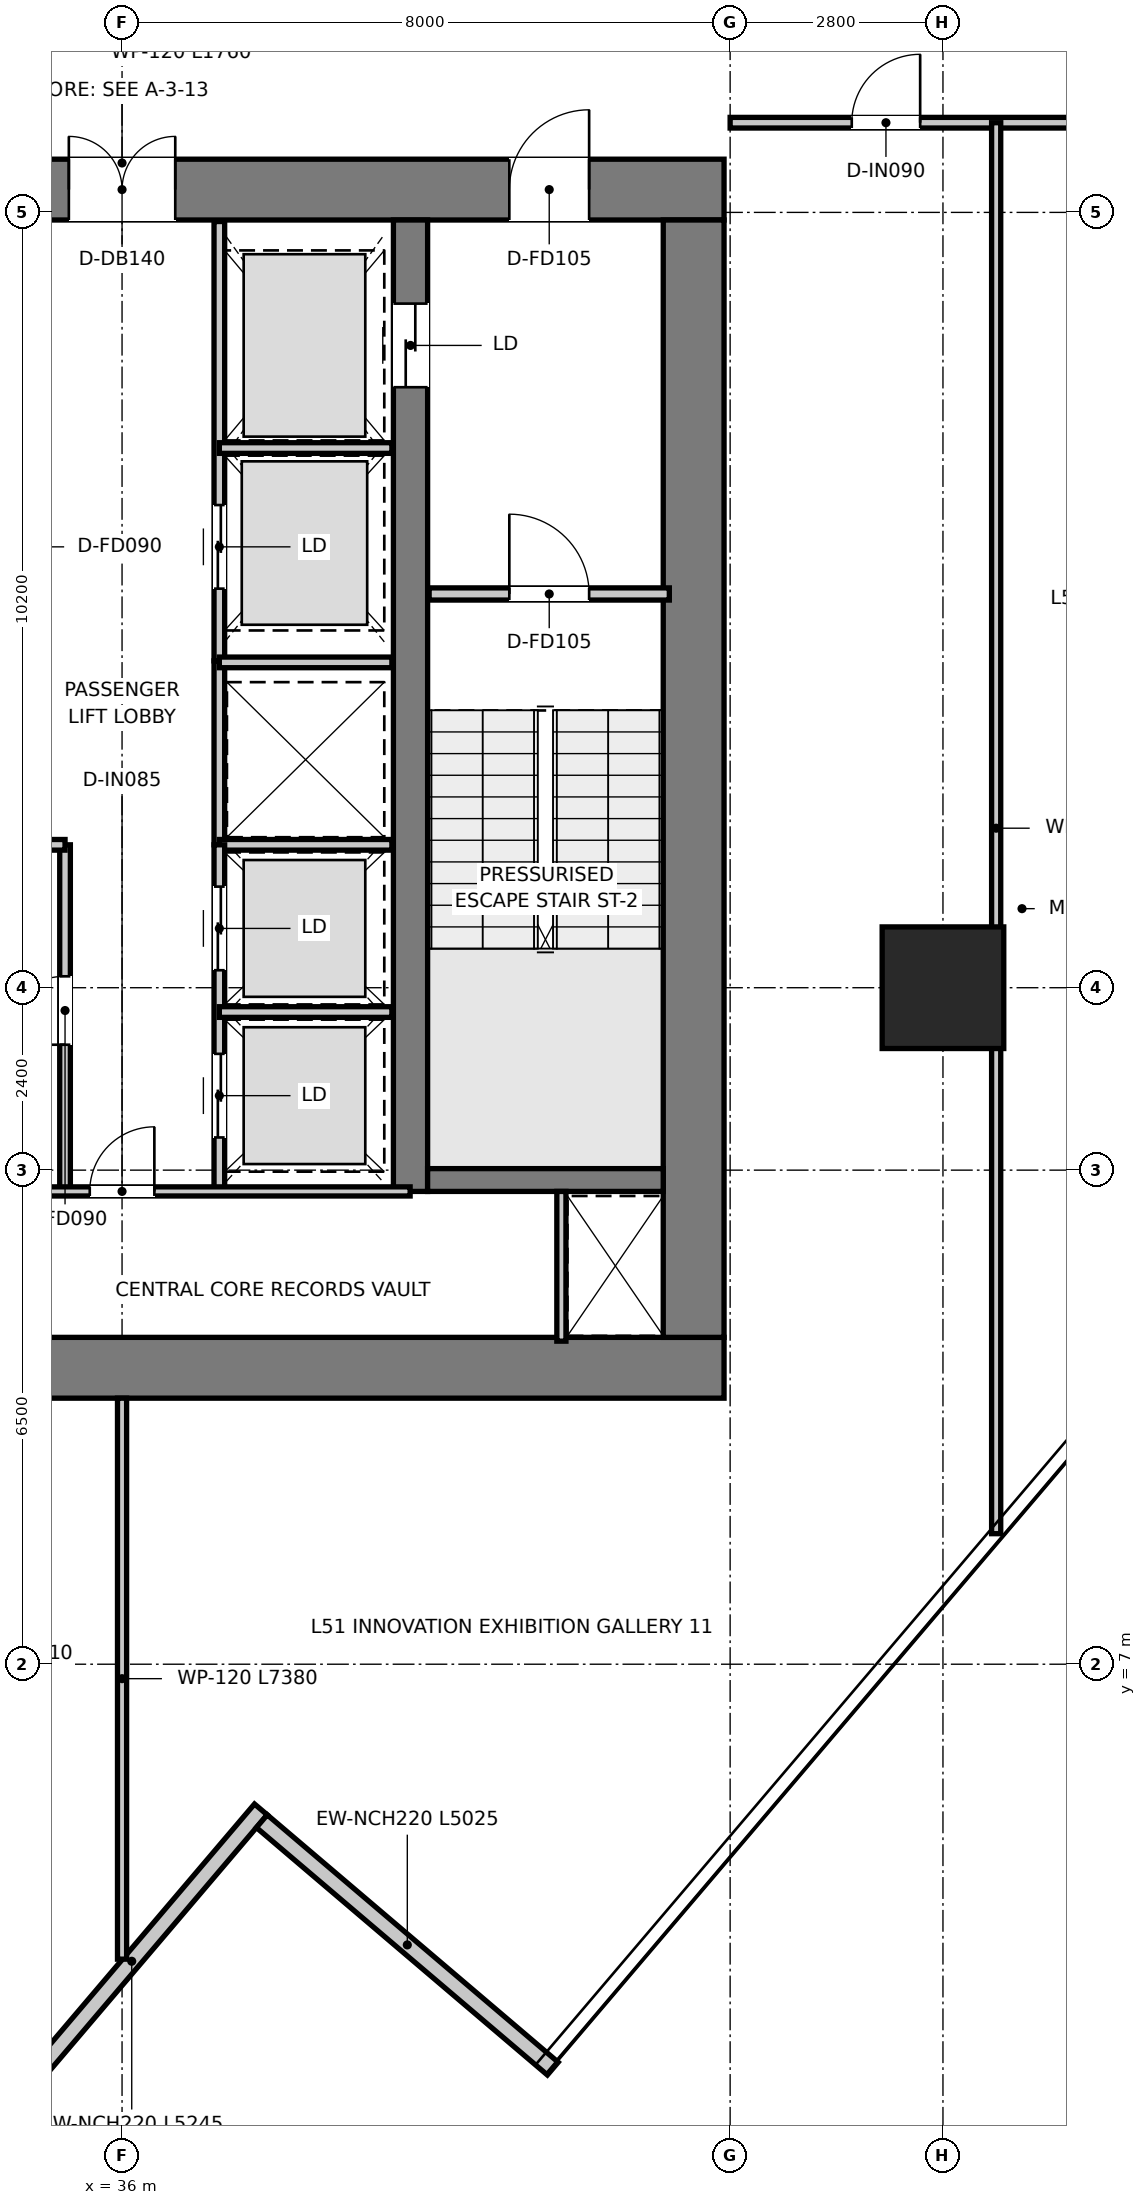
"""IFC4 building model, lengths in metres.
Left out: names, types, materials, properties, quantities, classifications, styles, units other than length and angle.
Written with IfcOpenShell. Run it as: python <this file> out.ifc"""

import sys

from ifc_helpers import new_model, si_unit, direction, frame, frame_2d, origin, origin_2d, place, context, subcontext, project, spatial, rectangle, extrude, source, transform, mapped, element, fill, save


model = new_model("IFC4")
c1 = context("Model", 3, precision=1e-05, world=origin(), true_north=direction((0.0, 1.0)))
c2 = subcontext(c1, "Body", "Model", "MODEL_VIEW")
j1 = project(units=[si_unit("LENGTHUNIT", "METRE"), si_unit("PLANEANGLEUNIT", "RADIAN")], contexts=[c1])
p1 = place(None, origin())
s1 = spatial("IfcSite", under=j1, at=p1, CompositionType="ELEMENT")
p2 = place(p1, origin())
s2 = spatial("IfcBuilding", under=s1, at=p2, CompositionType="ELEMENT")
p3 = place(p2, frame((0.0, 0.0, 211.25)))
s3 = spatial("IfcBuildingStorey", under=s2, at=p3, CompositionType="ELEMENT", Elevation=211.25)
p4 = place(p3, frame((28.08, 10.9, 0.0), z_axis=(0.0, 0.0, 1.0), x_axis=(1.0, 0.0, 0.0)))
e1 = element("IfcWall", 1, at=p4, inside=s3, PredefinedType="SHEAR", context=c2, shape_type="SweptSolid", body=[
    extrude(rectangle(XDim=15.84, YDim=0.8, at=frame_2d((7.92, 0.0))), origin(), (0.0, 0.0, 1.0), 3.95),
])
p5 = place(p3, frame((28.08, 26.4, 0.0), z_axis=(0.0, 0.0, 1.0), x_axis=(1.0, 0.0, 0.0)))
e2 = element("IfcWall", 2, at=p5, inside=s3, PredefinedType="SHEAR", context=c2, shape_type="SweptSolid", body=[
    extrude(rectangle(XDim=15.84, YDim=0.8, at=frame_2d((7.92, 0.0))), origin(), (0.0, 0.0, 1.0), 3.95),
])
p6 = place(p5, frame((7.22, 0.0, 0.0)))
e3 = element("IfcOpeningElement", 3, at=p6, cuts=e2, PredefinedType="OPENING", context=c2, shape_type="SweptSolid", body=[
    extrude(rectangle(XDim=1.4, YDim=2.2, at=frame_2d((0.7, 1.1))), frame((0.0, 0.41, 0.0), z_axis=(0.0, -1.0, 0.0), x_axis=(1.0, 0.0, 0.0)), (0.0, 0.0, 1.0), 0.82),
])
p7 = place(p5, frame((1.775, 0.0, 0.0)))
e4 = element("IfcOpeningElement", 4, at=p7, cuts=e2, PredefinedType="OPENING", context=c2, shape_type="SweptSolid", body=[
    extrude(rectangle(XDim=1.05, YDim=2.1, at=frame_2d((0.525, 1.05))), frame((0.0, 0.41, 0.0), z_axis=(0.0, -1.0, 0.0), x_axis=(1.0, 0.0, 0.0)), (0.0, 0.0, 1.0), 0.82),
])
p8 = place(p5, frame((13.015, 0.0, 0.0)))
e5 = element("IfcOpeningElement", 5, at=p8, cuts=e2, PredefinedType="OPENING", context=c2, shape_type="SweptSolid", body=[
    extrude(rectangle(XDim=1.05, YDim=2.1, at=frame_2d((0.525, 1.05))), frame((0.0, 0.41, 0.0), z_axis=(0.0, -1.0, 0.0), x_axis=(1.0, 0.0, 0.0)), (0.0, 0.0, 1.0), 0.82),
])
p9 = place(p3, frame((43.52, 11.3, 0.0), z_axis=(0.0, 0.0, 1.0), x_axis=(0.0, 1.0, 0.0)))
e6 = element("IfcWall", 6, at=p9, inside=s3, PredefinedType="SHEAR", context=c2, shape_type="SweptSolid", body=[
    extrude(rectangle(XDim=14.7, YDim=0.8, at=frame_2d((7.35, 0.0))), origin(), (0.0, 0.0, 1.0), 3.95),
])
p10 = place(p3, frame((39.795, 13.22, 0.0), z_axis=(0.0, 0.0, 1.0), x_axis=(0.0, 1.0, 0.0)))
e7 = element("IfcWall", 7, at=p10, inside=s3, PredefinedType="SHEAR", context=c2, shape_type="SweptSolid", body=[
    extrude(rectangle(XDim=12.78, YDim=0.45, at=frame_2d((6.39, 0.0))), origin(), (0.0, 0.0, 1.0), 3.95),
])
p11 = place(p10, frame((10.58, 0.0, 0.0)))
e8 = element("IfcOpeningElement", 8, at=p11, cuts=e7, PredefinedType="OPENING", context=c2, shape_type="SweptSolid", body=[
    extrude(rectangle(XDim=1.1, YDim=2.15, at=frame_2d((0.55, 1.075))), frame((0.0, 0.235, 0.0), z_axis=(0.0, -1.0, 0.0), x_axis=(1.0, 0.0, 0.0)), (0.0, 0.0, 1.0), 0.47),
])
p12 = place(p3, frame((40.02, 13.37, 0.0), z_axis=(0.0, 0.0, 1.0), x_axis=(1.0, 0.0, 0.0)))
e9 = element("IfcWall", 9, at=p12, inside=s3, PredefinedType="SHEAR", context=c2, shape_type="SweptSolid", body=[
    extrude(rectangle(XDim=3.1, YDim=0.3, at=frame_2d((1.55, 0.0))), origin(), (0.0, 0.0, 1.0), 3.95),
])
m1 = source(origin(), c2, "Body", "SweptSolid", [
    extrude(rectangle(XDim=1.6, YDim=1.6, at=origin_2d()), origin(), (0.0, 0.0, 1.0), 3.95),
])
p13 = place(p3, frame((46.8, 15.9, 0.0), z_axis=(0.0, 0.0, 1.0), x_axis=(1.0, 0.0, 0.0)))
e10 = element("IfcColumn", 10, at=p13, inside=s3, PredefinedType="USERDEFINED", context=c2, shape_type="MappedRepresentation", body=[
    mapped(m1, transform((0.0, 0.0, 0.0), x_axis=(1.0, 0.0, 0.0), y_axis=(0.0, 1.0, 0.0), z_axis=(0.0, 0.0, 1.0), scale=1.0)),
])
p14 = place(p3, frame((34.428, 1.094, 0.0), z_axis=(0.0, 0.0, 1.0), x_axis=(0.647807844474, 0.761803778304, 0.0)))
e11 = element("IfcWall", 11, at=p14, inside=s3, PredefinedType="ELEMENTEDWALL", context=c2, shape_type="SweptSolid", body=[
    extrude(rectangle(XDim=5.245, YDim=0.22, at=frame_2d((2.623, 0.0))), origin(), (0.0, 0.0, 1.0), 3.67),
])
p15 = place(p3, frame((37.839, 4.935, 0.0), z_axis=(0.0, 0.0, 1.0), x_axis=(0.761819427757, -0.647789440707, 0.0)))
e12 = element("IfcWall", 12, at=p15, inside=s3, PredefinedType="ELEMENTEDWALL", context=c2, shape_type="SweptSolid", body=[
    extrude(rectangle(XDim=5.025, YDim=0.22, at=frame_2d((2.512, 0.0))), origin(), (0.0, 0.0, 1.0), 3.67),
])
p16 = place(p3, frame((40.04, 21.08, 0.0), z_axis=(0.0, 0.0, 1.0), x_axis=(1.0, 0.0, 0.0)))
e13 = element("IfcWall", 13, at=p16, inside=s3, PredefinedType="PARTITIONING", context=c2, shape_type="SweptSolid", body=[
    extrude(rectangle(XDim=3.16, YDim=0.16, at=frame_2d((1.58, 0.0))), origin(), (0.0, 0.0, 1.0), 3.67),
])
p17 = place(p16, frame((1.055, 0.0, 0.0)))
e14 = element("IfcOpeningElement", 14, at=p17, cuts=e13, PredefinedType="OPENING", context=c2, shape_type="SweptSolid", body=[
    extrude(rectangle(XDim=1.05, YDim=2.1, at=frame_2d((0.525, 1.05))), frame((0.0, 0.09, 0.0), z_axis=(0.0, -1.0, 0.0), x_axis=(1.0, 0.0, 0.0)), (0.0, 0.0, 1.0), 0.18),
])
p18 = place(p3, frame((37.28, 20.2, 0.0), z_axis=(0.0, 0.0, 1.0), x_axis=(0.0, 1.0, 0.0)))
e15 = element("IfcWall", 15, at=p18, inside=s3, PredefinedType="PARTITIONING", context=c2, shape_type="SweptSolid", body=[
    extrude(rectangle(XDim=5.78, YDim=0.14, at=frame_2d((2.89, 0.0))), origin(), (0.0, 0.0, 1.0), 2.67),
])
p19 = place(p18, frame((0.95, 0.0, 0.0)))
e16 = element("IfcOpeningElement", 16, at=p19, cuts=e15, PredefinedType="OPENING", context=c2, shape_type="SweptSolid", body=[
    extrude(rectangle(XDim=1.1, YDim=2.15, at=frame_2d((0.55, 1.075))), frame((0.0, 0.08, 0.0), z_axis=(0.0, -1.0, 0.0), x_axis=(1.0, 0.0, 0.0)), (0.0, 0.0, 1.0), 0.16),
])
p20 = place(p3, frame((37.28, 23.0, 0.0), z_axis=(0.0, 0.0, 1.0), x_axis=(1.0, 0.0, 0.0)))
e17 = element("IfcWall", 17, at=p20, inside=s3, PredefinedType="PARTITIONING", context=c2, shape_type="SweptSolid", body=[
    extrude(rectangle(XDim=2.27, YDim=0.14, at=frame_2d((1.135, 0.0))), origin(), (0.0, 0.0, 1.0), 2.67),
])
p21 = place(p3, frame((37.28, 17.78, 0.0), z_axis=(0.0, 0.0, 1.0), x_axis=(0.0, 1.0, 0.0)))
e18 = element("IfcWall", 18, at=p21, inside=s3, PredefinedType="PARTITIONING", context=c2, shape_type="SweptSolid", body=[
    extrude(rectangle(XDim=2.42, YDim=0.14, at=frame_2d((1.21, 0.0))), origin(), (0.0, 0.0, 1.0), 3.67),
])
for number, where, z_axis, x_axis in (
    (19, (37.28, 17.78, 0.0), (0.0, 0.0, 1.0), (1.0, 0.0, 0.0)),
    (20, (37.28, 20.18, 0.0), (0.0, 0.0, 1.0), (1.0, 0.0, 0.0)),
):
    element("IfcWall", number, at=place(p3, frame(where, z_axis=z_axis, x_axis=x_axis)), inside=s3, PredefinedType="PARTITIONING", context=c2, shape_type="SweptSolid", body=[
        extrude(rectangle(XDim=2.27, YDim=0.14, at=frame_2d((1.135, 0.0))), origin(), (0.0, 0.0, 1.0), 3.67),
    ])
p22 = place(p3, frame((35.25, 13.22, 0.0), z_axis=(0.0, 0.0, 1.0), x_axis=(0.0, 1.0, 0.0)))
e21 = element("IfcWall", 21, at=p22, inside=s3, PredefinedType="PARTITIONING", context=c2, shape_type="SweptSolid", body=[
    extrude(rectangle(XDim=4.56, YDim=0.14, at=frame_2d((2.28, 0.0))), origin(), (0.0, 0.0, 1.0), 3.67),
])
p23 = place(p22, frame((1.93, 0.0, 0.0)))
e22 = element("IfcOpeningElement", 22, at=p23, cuts=e21, PredefinedType="OPENING", context=c2, shape_type="SweptSolid", body=[
    extrude(rectangle(XDim=0.9, YDim=2.1, at=frame_2d((0.45, 1.05))), frame((0.0, 0.08, 0.0), z_axis=(0.0, -1.0, 0.0), x_axis=(1.0, 0.0, 0.0)), (0.0, 0.0, 1.0), 0.16),
])
p24 = place(p3, frame((34.72, 17.78, 0.0), z_axis=(0.0, 0.0, 1.0), x_axis=(1.0, 0.0, 0.0)))
e23 = element("IfcWall", 23, at=p24, inside=s3, PredefinedType="PARTITIONING", context=c2, shape_type="SweptSolid", body=[
    extrude(rectangle(XDim=0.53, YDim=0.14, at=frame_2d((0.265, 0.0))), origin(), (0.0, 0.0, 1.0), 3.67),
])
p25 = place(p3, frame((37.28, 13.22, 0.0), z_axis=(0.0, 0.0, 1.0), x_axis=(0.0, 1.0, 0.0)))
e24 = element("IfcWall", 24, at=p25, inside=s3, PredefinedType="PARTITIONING", context=c2, shape_type="SweptSolid", body=[
    extrude(rectangle(XDim=4.56, YDim=0.14, at=frame_2d((2.28, 0.0))), origin(), (0.0, 0.0, 1.0), 3.67),
])
p26 = place(p25, frame((0.71, 0.0, 0.0)))
e25 = element("IfcOpeningElement", 25, at=p26, cuts=e24, PredefinedType="OPENING", context=c2, shape_type="SweptSolid", body=[
    extrude(rectangle(XDim=1.1, YDim=2.15, at=frame_2d((0.55, 1.075))), frame((0.0, 0.08, 0.0), z_axis=(0.0, -1.0, 0.0), x_axis=(1.0, 0.0, 0.0)), (0.0, 0.0, 1.0), 0.16),
])
p27 = place(p25, frame((2.91, 0.0, 0.0)))
e26 = element("IfcOpeningElement", 26, at=p27, cuts=e24, PredefinedType="OPENING", context=c2, shape_type="SweptSolid", body=[
    extrude(rectangle(XDim=1.1, YDim=2.15, at=frame_2d((0.55, 1.075))), frame((0.0, 0.08, 0.0), z_axis=(0.0, -1.0, 0.0), x_axis=(1.0, 0.0, 0.0)), (0.0, 0.0, 1.0), 0.16),
])
p28 = place(p3, frame((37.28, 15.58, 0.0), z_axis=(0.0, 0.0, 1.0), x_axis=(1.0, 0.0, 0.0)))
e27 = element("IfcWall", 27, at=p28, inside=s3, PredefinedType="PARTITIONING", context=c2, shape_type="SweptSolid", body=[
    extrude(rectangle(XDim=2.27, YDim=0.14, at=frame_2d((1.135, 0.0))), origin(), (0.0, 0.0, 1.0), 3.67),
])
p29 = place(p3, frame((41.78, 11.25, 0.0), z_axis=(0.0, 0.0, 1.0), x_axis=(0.0, 1.0, 0.0)))
e28 = element("IfcWall", 28, at=p29, inside=s3, PredefinedType="PARTITIONING", context=c2, shape_type="SweptSolid", body=[
    extrude(rectangle(XDim=1.97, YDim=0.12, at=frame_2d((0.985, 0.0))), origin(), (0.0, 0.0, 1.0), 3.67),
])
p30 = place(p3, frame((32.21, 13.22, 0.0), z_axis=(0.0, 0.0, 1.0), x_axis=(1.0, 0.0, 0.0)))
e29 = element("IfcWall", 29, at=p30, inside=s3, PredefinedType="PARTITIONING", context=c2, shape_type="SweptSolid", body=[
    extrude(rectangle(XDim=7.58, YDim=0.12, at=frame_2d((3.79, 0.0))), origin(), (0.0, 0.0, 1.0), 3.67),
])
p31 = place(p30, frame((3.365, 0.0, 0.0)))
e30 = element("IfcOpeningElement", 30, at=p31, cuts=e29, PredefinedType="OPENING", context=c2, shape_type="SweptSolid", body=[
    extrude(rectangle(XDim=0.85, YDim=2.1, at=frame_2d((0.425, 1.05))), frame((0.0, 0.07, 0.0), z_axis=(0.0, -1.0, 0.0), x_axis=(1.0, 0.0, 0.0)), (0.0, 0.0, 1.0), 0.14),
])
p32 = place(p3, frame((44.0, 27.28, 0.0), z_axis=(0.0, 0.0, 1.0), x_axis=(1.0, 0.0, 0.0)))
e31 = element("IfcWall", 31, at=p32, inside=s3, PredefinedType="PARTITIONING", context=c2, shape_type="SweptSolid", body=[
    extrude(rectangle(XDim=14.898, YDim=0.14, at=frame_2d((7.449, 0.0))), origin(), (0.0, 0.0, 1.0), 3.03),
])
p33 = place(p32, frame((1.6, 0.0, 0.0)))
e32 = element("IfcOpeningElement", 32, at=p33, cuts=e31, PredefinedType="OPENING", context=c2, shape_type="SweptSolid", body=[
    extrude(rectangle(XDim=0.9, YDim=2.1, at=frame_2d((0.45, 1.05))), frame((0.0, 0.08, 0.0), z_axis=(0.0, -1.0, 0.0), x_axis=(1.0, 0.0, 0.0)), (0.0, 0.0, 1.0), 0.16),
])
p34 = place(p32, frame((4.75, 0.0, 0.0)))
e33 = element("IfcOpeningElement", 33, at=p34, cuts=e31, PredefinedType="OPENING", context=c2, shape_type="SweptSolid", body=[
    extrude(rectangle(XDim=0.9, YDim=2.1, at=frame_2d((0.45, 1.05))), frame((0.0, 0.08, 0.0), z_axis=(0.0, -1.0, 0.0), x_axis=(1.0, 0.0, 0.0)), (0.0, 0.0, 1.0), 0.16),
])
p35 = place(p32, frame((12.124, 0.0, 0.0)))
e34 = element("IfcOpeningElement", 34, at=p35, cuts=e31, PredefinedType="OPENING", context=c2, shape_type="SweptSolid", body=[
    extrude(rectangle(XDim=0.9, YDim=2.1, at=frame_2d((0.45, 1.05))), frame((0.0, 0.08, 0.0), z_axis=(0.0, -1.0, 0.0), x_axis=(1.0, 0.0, 0.0)), (0.0, 0.0, 1.0), 0.16),
])
p36 = place(p3, frame((36.0, 3.12, 0.0), z_axis=(0.0, 0.0, 1.0), x_axis=(0.0, 1.0, 0.0)))
e35 = element("IfcWall", 35, at=p36, inside=s3, PredefinedType="PARTITIONING", context=c2, shape_type="SweptSolid", body=[
    extrude(rectangle(XDim=7.38, YDim=0.12, at=frame_2d((3.69, 0.0))), origin(), (0.0, 0.0, 1.0), 3.67),
])
p37 = place(p3, frame((47.5, 8.717, 0.0), z_axis=(0.0, 0.0, 1.0), x_axis=(0.0, 1.0, 0.0)))
e36 = element("IfcWall", 36, at=p37, inside=s3, PredefinedType="PARTITIONING", context=c2, shape_type="SweptSolid", body=[
    extrude(rectangle(XDim=18.563, YDim=0.12, at=frame_2d((9.281, 0.0))), origin(), (0.0, 0.0, 1.0), 3.18),
])
p38 = place(p17, origin())
e37 = element("IfcDoor", 37, at=p38, inside=s3, OperationType="SINGLE_SWING_LEFT", PredefinedType="DOOR", context=c2, shape_type="SweptSolid", body=[
    extrude(rectangle(XDim=1.05, YDim=2.1, at=frame_2d((0.525, 1.05))), frame((0.0, 0.025, 0.0), z_axis=(0.0, -1.0, 0.0), x_axis=(1.0, 0.0, 0.0)), (0.0, 0.0, 1.0), 0.05),
])
fill(e14, e37)
p39 = place(p6, origin())
e38 = element("IfcDoor", 38, at=p39, inside=s3, OperationType="DOUBLE_DOOR_SINGLE_SWING", PredefinedType="DOOR", context=c2, shape_type="SweptSolid", body=[
    extrude(rectangle(XDim=1.4, YDim=2.2, at=frame_2d((0.7, 1.1))), frame((0.0, 0.025, 0.0), z_axis=(0.0, -1.0, 0.0), x_axis=(1.0, 0.0, 0.0)), (0.0, 0.0, 1.0), 0.05),
])
fill(e3, e38)
p40 = place(p8, origin())
e39 = element("IfcDoor", 39, at=p40, inside=s3, OperationType="SINGLE_SWING_RIGHT", PredefinedType="DOOR", context=c2, shape_type="SweptSolid", body=[
    extrude(rectangle(XDim=1.05, YDim=2.1, at=frame_2d((0.525, 1.05))), frame((0.0, 0.025, 0.0), z_axis=(0.0, -1.0, 0.0), x_axis=(1.0, 0.0, 0.0)), (0.0, 0.0, 1.0), 0.05),
])
fill(e5, e39)
p41 = place(p11, origin())
e40 = element("IfcDoor", 40, at=p41, inside=s3, OperationType="DOUBLE_DOOR_SLIDING", PredefinedType="DOOR", context=c2, shape_type="SweptSolid", body=[
    extrude(rectangle(XDim=1.1, YDim=2.15, at=frame_2d((0.55, 1.075))), frame((0.0, 0.025, 0.0), z_axis=(0.0, -1.0, 0.0), x_axis=(1.0, 0.0, 0.0)), (0.0, 0.0, 1.0), 0.05),
])
fill(e8, e40)
p42 = place(p19, origin())
e41 = element("IfcDoor", 41, at=p42, inside=s3, OperationType="DOUBLE_DOOR_SLIDING", PredefinedType="DOOR", context=c2, shape_type="SweptSolid", body=[
    extrude(rectangle(XDim=1.1, YDim=2.15, at=frame_2d((0.55, 1.075))), frame((0.0, 0.025, 0.0), z_axis=(0.0, -1.0, 0.0), x_axis=(1.0, 0.0, 0.0)), (0.0, 0.0, 1.0), 0.05),
])
fill(e16, e41)
p43 = place(p23, origin())
e42 = element("IfcDoor", 42, at=p43, inside=s3, OperationType="SINGLE_SWING_LEFT", PredefinedType="DOOR", context=c2, shape_type="SweptSolid", body=[
    extrude(rectangle(XDim=0.9, YDim=2.1, at=frame_2d((0.45, 1.05))), frame((0.0, 0.025, 0.0), z_axis=(0.0, -1.0, 0.0), x_axis=(1.0, 0.0, 0.0)), (0.0, 0.0, 1.0), 0.05),
])
fill(e22, e42)
p44 = place(p26, origin())
e43 = element("IfcDoor", 43, at=p44, inside=s3, OperationType="DOUBLE_DOOR_SLIDING", PredefinedType="DOOR", context=c2, shape_type="SweptSolid", body=[
    extrude(rectangle(XDim=1.1, YDim=2.15, at=frame_2d((0.55, 1.075))), frame((0.0, 0.025, 0.0), z_axis=(0.0, -1.0, 0.0), x_axis=(1.0, 0.0, 0.0)), (0.0, 0.0, 1.0), 0.05),
])
fill(e25, e43)
p45 = place(p27, origin())
e44 = element("IfcDoor", 44, at=p45, inside=s3, OperationType="DOUBLE_DOOR_SLIDING", PredefinedType="DOOR", context=c2, shape_type="SweptSolid", body=[
    extrude(rectangle(XDim=1.1, YDim=2.15, at=frame_2d((0.55, 1.075))), frame((0.0, 0.025, 0.0), z_axis=(0.0, -1.0, 0.0), x_axis=(1.0, 0.0, 0.0)), (0.0, 0.0, 1.0), 0.05),
])
fill(e26, e44)
p46 = place(p31, origin())
e45 = element("IfcDoor", 45, at=p46, inside=s3, OperationType="SINGLE_SWING_RIGHT", PredefinedType="DOOR", context=c2, shape_type="SweptSolid", body=[
    extrude(rectangle(XDim=0.85, YDim=2.1, at=frame_2d((0.425, 1.05))), frame((0.0, 0.025, 0.0), z_axis=(0.0, -1.0, 0.0), x_axis=(1.0, 0.0, 0.0)), (0.0, 0.0, 1.0), 0.05),
])
fill(e30, e45)
p47 = place(p33, origin())
e46 = element("IfcDoor", 46, at=p47, inside=s3, OperationType="SINGLE_SWING_RIGHT", PredefinedType="DOOR", context=c2, shape_type="SweptSolid", body=[
    extrude(rectangle(XDim=0.9, YDim=2.1, at=frame_2d((0.45, 1.05))), frame((0.0, 0.025, 0.0), z_axis=(0.0, -1.0, 0.0), x_axis=(1.0, 0.0, 0.0)), (0.0, 0.0, 1.0), 0.05),
])
fill(e32, e46)
save(model, sys.argv[1])
